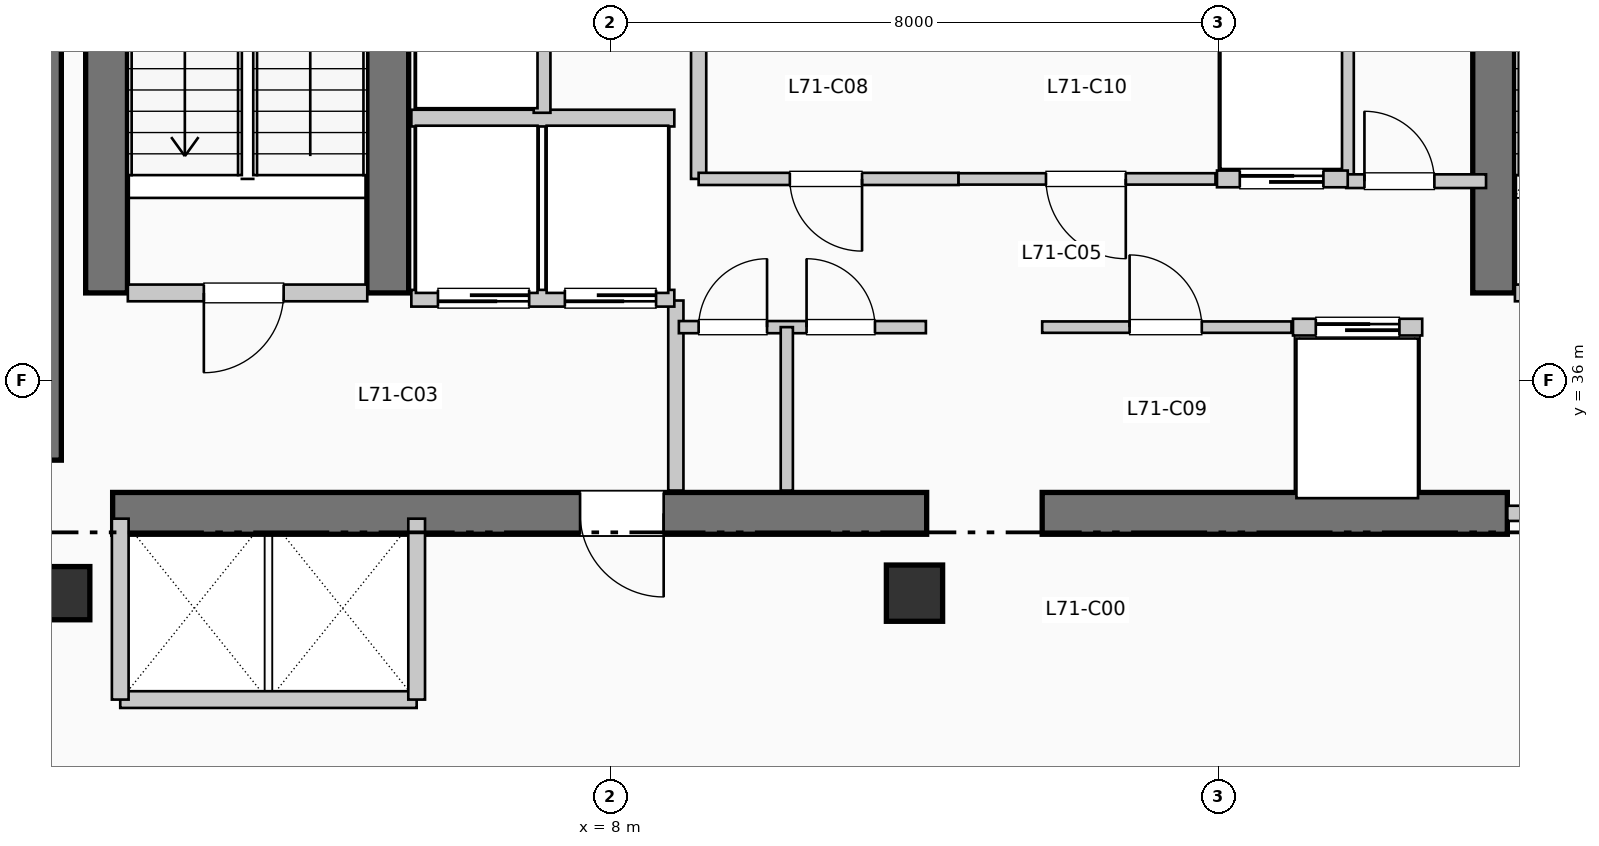
"""IFC4 building model, lengths in metres.
Left out: names, types, materials, properties, quantities, classifications, styles, units other than length and angle.
Written with IfcOpenShell. Run it as: python <this file> out.ifc"""

import sys

from ifc_helpers import new_model, si_unit, direction, frame, frame_2d, origin, origin_2d, place, context, subcontext, project, spatial, rectangle, extrude, element, fill, save


model = new_model("IFC4")
c1 = context("Model", 3, precision=1e-05, world=origin(), true_north=direction((0.0, 1.0)))
c2 = subcontext(c1, "Body", "Model", "MODEL_VIEW")
j1 = project(units=[si_unit("LENGTHUNIT", "METRE"), si_unit("PLANEANGLEUNIT", "RADIAN")], contexts=[c1])
p1 = place(None, origin())
s1 = spatial("IfcSite", under=j1, at=p1, CompositionType="ELEMENT")
p2 = place(p1, origin())
s2 = spatial("IfcBuilding", under=s1, at=p2, CompositionType="ELEMENT")
p3 = place(p2, frame((0.0, 0.0, 292.05)))
s3 = spatial("IfcBuildingStorey", under=s2, at=p3, CompositionType="ELEMENT", Elevation=292.05)
p4 = place(p3, frame((0.5, 34.95, 0.0), z_axis=(0.0, 0.0, 1.0), x_axis=(0.0, 1.0, 0.0)))
e1 = element("IfcWall", 1, at=p4, inside=s3, PredefinedType="SHEAR", context=c2, shape_type="SweptSolid", body=[
    extrude(rectangle(XDim=7.9, YDim=0.55, at=frame_2d((3.95, 0.0))), origin(), (0.0, 0.0, 1.0), 3.96),
])
p5 = place(p3, frame((1.45, 34.25, 0.0), z_axis=(0.0, 0.0, 1.0), x_axis=(1.0, 0.0, 0.0)))
e2 = element("IfcWall", 2, at=p5, inside=s3, PredefinedType="SHEAR", context=c2, shape_type="SweptSolid", body=[
    extrude(rectangle(XDim=10.71, YDim=0.55, at=frame_2d((5.355, 0.0))), origin(), (0.0, 0.0, 1.0), 3.96),
])
p6 = place(p5, frame((7.25, 0.0, 0.0), z_axis=(0.0, 0.0, 1.0), x_axis=(-1.0, 0.0, 0.0)))
e3 = element("IfcOpeningElement", 3, at=p6, cuts=e2, PredefinedType="OPENING", context=c2, shape_type="SweptSolid", body=[
    extrude(rectangle(XDim=1.1, YDim=2.15, at=frame_2d((0.55, 1.075))), frame((0.0, 0.285, 0.0), z_axis=(0.0, -1.0, 0.0), x_axis=(1.0, 0.0, 0.0)), (0.0, 0.0, 1.0), 0.57),
])
p7 = place(p3, frame((13.68, 34.25, 0.0), z_axis=(0.0, 0.0, 1.0), x_axis=(1.0, 0.0, 0.0)))
e4 = element("IfcWall", 4, at=p7, inside=s3, PredefinedType="SHEAR", context=c2, shape_type="SweptSolid", body=[
    extrude(rectangle(XDim=6.12, YDim=0.55, at=frame_2d((3.06, 0.0))), origin(), (0.0, 0.0, 1.0), 3.96),
])
for number, where, z_axis, x_axis in (
    (5, (1.37, 37.15, 0.0), (0.0, 0.0, 1.0), (0.0, 1.0, 0.0)),
    (6, (5.07, 37.15, 0.0), (0.0, 0.0, 1.0), (0.0, 1.0, 0.0)),
    (7, (19.62, 37.15, 0.0), (0.0, 0.0, 1.0), (0.0, 1.0, 0.0)),
):
    element("IfcWall", number, at=place(p3, frame(where, z_axis=z_axis, x_axis=x_axis)), inside=s3, PredefinedType="SHEAR", context=c2, shape_type="SweptSolid", body=[
        extrude(rectangle(XDim=7.89, YDim=0.55, at=frame_2d((3.945, 0.0))), origin(), (0.0, 0.0, 1.0), 3.96),
    ])
p8 = place(p3, frame((0.8, 33.2, 0.0), z_axis=(0.0, 0.0, 1.0), x_axis=(1.0, 0.0, 0.0)))
e8 = element("IfcColumn", 8, at=p8, inside=s3, PredefinedType="COLUMN", context=c2, shape_type="SweptSolid", body=[
    extrude(rectangle(XDim=0.7, YDim=0.7, at=origin_2d()), origin(), (0.0, 0.0, 1.0), 3.96),
])
p9 = place(p3, frame((12.0, 33.2, 0.0), z_axis=(0.0, 0.0, 1.0), x_axis=(1.0, 0.0, 0.0)))
e9 = element("IfcColumn", 9, at=p9, inside=s3, PredefinedType="COLUMN", context=c2, shape_type="SweptSolid", body=[
    extrude(rectangle(XDim=0.74, YDim=0.74, at=origin_2d()), origin(), (0.0, 0.0, 1.0), 3.96),
])
p10 = place(p3, frame((1.65, 37.15, 0.0), z_axis=(0.0, 0.0, 1.0), x_axis=(1.0, 0.0, 0.0)))
e10 = element("IfcWall", 10, at=p10, inside=s3, PredefinedType="PARTITIONING", context=c2, shape_type="SweptSolid", body=[
    extrude(rectangle(XDim=3.15, YDim=0.22, at=frame_2d((1.575, 0.0))), origin(), (0.0, 0.0, 1.0), 3.74),
])
p11 = place(p10, frame((2.05, 0.0, 0.0), z_axis=(0.0, 0.0, 1.0), x_axis=(-1.0, 0.0, 0.0)))
e11 = element("IfcOpeningElement", 11, at=p11, cuts=e10, PredefinedType="OPENING", context=c2, shape_type="SweptSolid", body=[
    extrude(rectangle(XDim=1.05, YDim=2.15, at=frame_2d((0.525, 1.075))), frame((0.0, 0.12, 0.0), z_axis=(0.0, -1.0, 0.0), x_axis=(1.0, 0.0, 0.0)), (0.0, 0.0, 1.0), 0.24),
])
p12 = place(p3, frame((8.86, 34.55, 0.0), z_axis=(0.0, 0.0, 1.0), x_axis=(0.0, 1.0, 0.0)))
e12 = element("IfcWall", 12, at=p12, inside=s3, PredefinedType="PARTITIONING", context=c2, shape_type="SweptSolid", body=[
    extrude(rectangle(XDim=2.5, YDim=0.2, at=frame_2d((1.25, 0.0))), origin(), (0.0, 0.0, 1.0), 3.74),
])
p13 = place(p3, frame((19.9, 37.15, 0.0), z_axis=(0.0, 0.0, 1.0), x_axis=(1.0, 0.0, 0.0)))
e13 = element("IfcWall", 13, at=p13, inside=s3, PredefinedType="PARTITIONING", context=c2, shape_type="SweptSolid", body=[
    extrude(rectangle(XDim=3.15, YDim=0.22, at=frame_2d((1.575, 0.0))), origin(), (0.0, 0.0, 1.0), 3.74),
])
p14 = place(p13, frame((2.05, 0.0, 0.0), z_axis=(0.0, 0.0, 1.0), x_axis=(-1.0, 0.0, 0.0)))
e14 = element("IfcOpeningElement", 14, at=p14, cuts=e13, PredefinedType="OPENING", context=c2, shape_type="SweptSolid", body=[
    extrude(rectangle(XDim=1.05, YDim=2.15, at=frame_2d((0.525, 1.075))), frame((0.0, 0.12, 0.0), z_axis=(0.0, -1.0, 0.0), x_axis=(1.0, 0.0, 0.0)), (0.0, 0.0, 1.0), 0.24),
])
p15 = place(p3, frame((19.8, 34.25, 0.0), z_axis=(0.0, 0.0, 1.0), x_axis=(1.0, 0.0, 0.0)))
e15 = element("IfcWall", 15, at=p15, inside=s3, PredefinedType="PARTITIONING", context=c2, shape_type="SweptSolid", body=[
    extrude(rectangle(XDim=3.25, YDim=0.2, at=frame_2d((1.625, 0.0))), origin(), (0.0, 0.0, 1.0), 3.74),
])
p16 = place(p15, frame((2.15, 0.0, 0.0), z_axis=(0.0, 0.0, 1.0), x_axis=(-1.0, 0.0, 0.0)))
e16 = element("IfcOpeningElement", 16, at=p16, cuts=e15, PredefinedType="OPENING", context=c2, shape_type="SweptSolid", body=[
    extrude(rectangle(XDim=1.1, YDim=2.15, at=frame_2d((0.55, 1.075))), frame((0.0, 0.11, 0.0), z_axis=(0.0, -1.0, 0.0), x_axis=(1.0, 0.0, 0.0)), (0.0, 0.0, 1.0), 0.22),
])
p17 = place(p3, frame((5.38, 37.08, 0.0), z_axis=(0.0, 0.0, 1.0), x_axis=(1.0, 0.0, 0.0)))
e17 = element("IfcWall", 17, at=p17, inside=s3, PredefinedType="PARTITIONING", context=c2, shape_type="SweptSolid", body=[
    extrude(rectangle(XDim=3.46, YDim=0.22, at=frame_2d((1.73, 0.0))), origin(), (0.0, 0.0, 1.0), 3.74),
])
p18 = place(p17, frame((1.55, 0.0, 0.0), z_axis=(0.0, 0.0, 1.0), x_axis=(-1.0, 0.0, 0.0)))
e18 = element("IfcOpeningElement", 18, at=p18, cuts=e17, PredefinedType="OPENING", context=c2, shape_type="SweptSolid", body=[
    extrude(rectangle(XDim=1.2, YDim=2.2, at=frame_2d((0.6, 1.1))), frame((0.0, 0.12, 0.0), z_axis=(0.0, -1.0, 0.0), x_axis=(1.0, 0.0, 0.0)), (0.0, 0.0, 1.0), 0.24),
])
p19 = place(p17, frame((3.22, 0.0, 0.0), z_axis=(0.0, 0.0, 1.0), x_axis=(-1.0, 0.0, 0.0)))
e19 = element("IfcOpeningElement", 19, at=p19, cuts=e17, PredefinedType="OPENING", context=c2, shape_type="SweptSolid", body=[
    extrude(rectangle(XDim=1.2, YDim=2.2, at=frame_2d((0.6, 1.1))), frame((0.0, 0.12, 0.0), z_axis=(0.0, -1.0, 0.0), x_axis=(1.0, 0.0, 0.0)), (0.0, 0.0, 1.0), 0.24),
])
p20 = place(p3, frame((5.38, 39.45, 0.0), z_axis=(0.0, 0.0, 1.0), x_axis=(1.0, 0.0, 0.0)))
e20 = element("IfcWall", 20, at=p20, inside=s3, PredefinedType="PARTITIONING", context=c2, shape_type="SweptSolid", body=[
    extrude(rectangle(XDim=3.46, YDim=0.22, at=frame_2d((1.73, 0.0))), origin(), (0.0, 0.0, 1.0), 3.74),
])
p21 = place(p3, frame((7.1, 39.52, 0.0), z_axis=(0.0, 0.0, 1.0), x_axis=(0.0, 1.0, 0.0)))
e21 = element("IfcWall", 21, at=p21, inside=s3, PredefinedType="PARTITIONING", context=c2, shape_type="SweptSolid", body=[
    extrude(rectangle(XDim=2.93, YDim=0.22, at=frame_2d((1.465, 0.0))), origin(), (0.0, 0.0, 1.0), 3.74),
])
p22 = place(p21, frame((0.85, 0.0, 0.0)))
e22 = element("IfcOpeningElement", 22, at=p22, cuts=e21, PredefinedType="OPENING", context=c2, shape_type="SweptSolid", body=[
    extrude(rectangle(XDim=1.1, YDim=2.2, at=frame_2d((0.55, 1.1))), frame((0.0, 0.12, 0.0), z_axis=(0.0, -1.0, 0.0), x_axis=(1.0, 0.0, 0.0)), (0.0, 0.0, 1.0), 0.24),
])
p23 = place(p3, frame((1.55, 31.8, 0.0), z_axis=(0.0, 0.0, 1.0), x_axis=(1.0, 0.0, 0.0)))
e23 = element("IfcWall", 23, at=p23, inside=s3, PredefinedType="PARTITIONING", context=c2, shape_type="SweptSolid", body=[
    extrude(rectangle(XDim=3.9, YDim=0.22, at=frame_2d((1.95, 0.0))), origin(), (0.0, 0.0, 1.0), 3.74),
])
for number, where, z_axis, x_axis in (
    (24, (1.55, 31.8, 0.0), (0.0, 0.0, 1.0), (0.0, 1.0, 0.0)),
    (25, (5.45, 31.8, 0.0), (0.0, 0.0, 1.0), (0.0, 1.0, 0.0)),
):
    element("IfcWall", number, at=place(p3, frame(where, z_axis=z_axis, x_axis=x_axis)), inside=s3, PredefinedType="PARTITIONING", context=c2, shape_type="SweptSolid", body=[
        extrude(rectangle(XDim=2.38, YDim=0.22, at=frame_2d((1.19, 0.0))), origin(), (0.0, 0.0, 1.0), 3.74),
    ])
for number, where, z_axis, x_axis in (
    (26, (9.16, 38.65, 0.0), (0.0, 0.0, 1.0), (0.0, 1.0, 0.0)),
    (27, (17.68, 38.65, 0.0), (0.0, 0.0, 1.0), (0.0, 1.0, 0.0)),
):
    element("IfcWall", number, at=place(p3, frame(where, z_axis=z_axis, x_axis=x_axis)), inside=s3, PredefinedType="PARTITIONING", context=c2, shape_type="SweptSolid", body=[
        extrude(rectangle(XDim=2.35, YDim=0.2, at=frame_2d((1.175, 0.0))), origin(), (0.0, 0.0, 1.0), 3.74),
    ])
p24 = place(p3, frame((17.68, 38.62, 0.0), z_axis=(0.0, 0.0, 1.0), x_axis=(1.0, 0.0, 0.0)))
e28 = element("IfcWall", 28, at=p24, inside=s3, PredefinedType="PARTITIONING", context=c2, shape_type="SweptSolid", body=[
    extrude(rectangle(XDim=1.84, YDim=0.18, at=frame_2d((0.92, 0.0))), origin(), (0.0, 0.0, 1.0), 3.74),
])
p25 = place(p24, frame((0.24, 0.0, 0.0)))
e29 = element("IfcOpeningElement", 29, at=p25, cuts=e28, PredefinedType="OPENING", context=c2, shape_type="SweptSolid", body=[
    extrude(rectangle(XDim=0.92, YDim=2.1, at=frame_2d((0.46, 1.05))), frame((0.0, 0.1, 0.0), z_axis=(0.0, -1.0, 0.0), x_axis=(1.0, 0.0, 0.0)), (0.0, 0.0, 1.0), 0.2),
])
p26 = place(p3, frame((8.9, 36.7, 0.0), z_axis=(0.0, 0.0, 1.0), x_axis=(1.0, 0.0, 0.0)))
e30 = element("IfcWall", 30, at=p26, inside=s3, PredefinedType="PARTITIONING", context=c2, shape_type="SweptSolid", body=[
    extrude(rectangle(XDim=3.25, YDim=0.16, at=frame_2d((1.625, 0.0))), origin(), (0.0, 0.0, 1.0), 3.74),
])
p27 = place(p26, frame((0.26, 0.0, 0.0)))
e31 = element("IfcOpeningElement", 31, at=p27, cuts=e30, PredefinedType="OPENING", context=c2, shape_type="SweptSolid", body=[
    extrude(rectangle(XDim=0.9, YDim=2.15, at=frame_2d((0.45, 1.075))), frame((0.0, 0.09, 0.0), z_axis=(0.0, -1.0, 0.0), x_axis=(1.0, 0.0, 0.0)), (0.0, 0.0, 1.0), 0.18),
])
p28 = place(p26, frame((1.68, 0.0, 0.0)))
e32 = element("IfcOpeningElement", 32, at=p28, cuts=e30, PredefinedType="OPENING", context=c2, shape_type="SweptSolid", body=[
    extrude(rectangle(XDim=0.9, YDim=2.15, at=frame_2d((0.45, 1.075))), frame((0.0, 0.09, 0.0), z_axis=(0.0, -1.0, 0.0), x_axis=(1.0, 0.0, 0.0)), (0.0, 0.0, 1.0), 0.18),
])
p29 = place(p3, frame((10.32, 34.55, 0.0), z_axis=(0.0, 0.0, 1.0), x_axis=(0.0, 1.0, 0.0)))
e33 = element("IfcWall", 33, at=p29, inside=s3, PredefinedType="PARTITIONING", context=c2, shape_type="SweptSolid", body=[
    extrude(rectangle(XDim=2.15, YDim=0.16, at=frame_2d((1.075, 0.0))), origin(), (0.0, 0.0, 1.0), 3.74),
])
p30 = place(p3, frame((9.16, 38.65, 0.0), z_axis=(0.0, 0.0, 1.0), x_axis=(1.0, 0.0, 0.0)))
e34 = element("IfcWall", 34, at=p30, inside=s3, PredefinedType="PARTITIONING", context=c2, shape_type="SweptSolid", body=[
    extrude(rectangle(XDim=3.42, YDim=0.16, at=frame_2d((1.71, 0.0))), origin(), (0.0, 0.0, 1.0), 3.74),
])
p31 = place(p30, frame((2.15, 0.0, 0.0), z_axis=(0.0, 0.0, 1.0), x_axis=(-1.0, 0.0, 0.0)))
e35 = element("IfcOpeningElement", 35, at=p31, cuts=e34, PredefinedType="OPENING", context=c2, shape_type="SweptSolid", body=[
    extrude(rectangle(XDim=0.95, YDim=2.15, at=frame_2d((0.475, 1.075))), frame((0.0, 0.09, 0.0), z_axis=(0.0, -1.0, 0.0), x_axis=(1.0, 0.0, 0.0)), (0.0, 0.0, 1.0), 0.18),
])
p32 = place(p3, frame((13.68, 36.7, 0.0), z_axis=(0.0, 0.0, 1.0), x_axis=(1.0, 0.0, 0.0)))
e36 = element("IfcWall", 36, at=p32, inside=s3, PredefinedType="PARTITIONING", context=c2, shape_type="SweptSolid", body=[
    extrude(rectangle(XDim=3.28, YDim=0.15, at=frame_2d((1.64, 0.0))), origin(), (0.0, 0.0, 1.0), 3.74),
])
p33 = place(p32, frame((1.15, 0.0, 0.0)))
e37 = element("IfcOpeningElement", 37, at=p33, cuts=e36, PredefinedType="OPENING", context=c2, shape_type="SweptSolid", body=[
    extrude(rectangle(XDim=0.95, YDim=2.15, at=frame_2d((0.475, 1.075))), frame((0.0, 0.085, 0.0), z_axis=(0.0, -1.0, 0.0), x_axis=(1.0, 0.0, 0.0)), (0.0, 0.0, 1.0), 0.17),
])
p34 = place(p3, frame((12.58, 38.65, 0.0), z_axis=(0.0, 0.0, 1.0), x_axis=(1.0, 0.0, 0.0)))
e38 = element("IfcWall", 38, at=p34, inside=s3, PredefinedType="PARTITIONING", context=c2, shape_type="SweptSolid", body=[
    extrude(rectangle(XDim=3.38, YDim=0.15, at=frame_2d((1.69, 0.0))), origin(), (0.0, 0.0, 1.0), 3.74),
])
p35 = place(p34, frame((2.2, 0.0, 0.0), z_axis=(0.0, 0.0, 1.0), x_axis=(-1.0, 0.0, 0.0)))
e39 = element("IfcOpeningElement", 39, at=p35, cuts=e38, PredefinedType="OPENING", context=c2, shape_type="SweptSolid", body=[
    extrude(rectangle(XDim=1.05, YDim=2.15, at=frame_2d((0.525, 1.075))), frame((0.0, 0.085, 0.0), z_axis=(0.0, -1.0, 0.0), x_axis=(1.0, 0.0, 0.0)), (0.0, 0.0, 1.0), 0.17),
])
p36 = place(p3, frame((16.98, 36.7, 0.0), z_axis=(0.0, 0.0, 1.0), x_axis=(1.0, 0.0, 0.0)))
e40 = element("IfcWall", 40, at=p36, inside=s3, PredefinedType="PARTITIONING", context=c2, shape_type="SweptSolid", body=[
    extrude(rectangle(XDim=1.7, YDim=0.22, at=frame_2d((0.85, 0.0))), origin(), (0.0, 0.0, 1.0), 3.74),
])
p37 = place(p36, frame((0.3, 0.0, 0.0)))
e41 = element("IfcOpeningElement", 41, at=p37, cuts=e40, PredefinedType="OPENING", context=c2, shape_type="SweptSolid", body=[
    extrude(rectangle(XDim=1.1, YDim=2.2, at=frame_2d((0.55, 1.1))), frame((0.0, 0.12, 0.0), z_axis=(0.0, -1.0, 0.0), x_axis=(1.0, 0.0, 0.0)), (0.0, 0.0, 1.0), 0.24),
])
p38 = place(p3, frame((15.98, 38.65, 0.0), z_axis=(0.0, 0.0, 1.0), x_axis=(1.0, 0.0, 0.0)))
e42 = element("IfcWall", 42, at=p38, inside=s3, PredefinedType="PARTITIONING", context=c2, shape_type="SweptSolid", body=[
    extrude(rectangle(XDim=1.72, YDim=0.22, at=frame_2d((0.86, 0.0))), origin(), (0.0, 0.0, 1.0), 3.74),
])
p39 = place(p38, frame((0.3, 0.0, 0.0)))
e43 = element("IfcOpeningElement", 43, at=p39, cuts=e42, PredefinedType="OPENING", context=c2, shape_type="SweptSolid", body=[
    extrude(rectangle(XDim=1.1, YDim=2.2, at=frame_2d((0.55, 1.1))), frame((0.0, 0.12, 0.0), z_axis=(0.0, -1.0, 0.0), x_axis=(1.0, 0.0, 0.0)), (0.0, 0.0, 1.0), 0.24),
])
p40 = place(p11, origin())
e44 = element("IfcDoor", 44, at=p40, inside=s3, OperationType="SINGLE_SWING_LEFT", PredefinedType="DOOR", context=c2, shape_type="SweptSolid", body=[
    extrude(rectangle(XDim=1.05, YDim=2.15, at=frame_2d((0.525, 1.075))), frame((0.0, 0.025, 0.0), z_axis=(0.0, -1.0, 0.0), x_axis=(1.0, 0.0, 0.0)), (0.0, 0.0, 1.0), 0.05),
])
fill(e11, e44)
p41 = place(p6, origin())
e45 = element("IfcDoor", 45, at=p41, inside=s3, OperationType="SINGLE_SWING_RIGHT", PredefinedType="DOOR", context=c2, shape_type="SweptSolid", body=[
    extrude(rectangle(XDim=1.1, YDim=2.15, at=frame_2d((0.55, 1.075))), frame((0.0, 0.025, 0.0), z_axis=(0.0, -1.0, 0.0), x_axis=(1.0, 0.0, 0.0)), (0.0, 0.0, 1.0), 0.05),
])
fill(e3, e45)
p42 = place(p18, origin())
e46 = element("IfcDoor", 46, at=p42, inside=s3, OperationType="SLIDING_TO_RIGHT", PredefinedType="DOOR", context=c2, shape_type="SweptSolid", body=[
    extrude(rectangle(XDim=1.2, YDim=2.2, at=frame_2d((0.6, 1.1))), frame((0.0, 0.025, 0.0), z_axis=(0.0, -1.0, 0.0), x_axis=(1.0, 0.0, 0.0)), (0.0, 0.0, 1.0), 0.05),
])
fill(e18, e46)
p43 = place(p19, origin())
e47 = element("IfcDoor", 47, at=p43, inside=s3, OperationType="SLIDING_TO_RIGHT", PredefinedType="DOOR", context=c2, shape_type="SweptSolid", body=[
    extrude(rectangle(XDim=1.2, YDim=2.2, at=frame_2d((0.6, 1.1))), frame((0.0, 0.025, 0.0), z_axis=(0.0, -1.0, 0.0), x_axis=(1.0, 0.0, 0.0)), (0.0, 0.0, 1.0), 0.05),
])
fill(e19, e47)
p44 = place(p25, origin())
e48 = element("IfcDoor", 48, at=p44, inside=s3, OperationType="SINGLE_SWING_LEFT", PredefinedType="DOOR", context=c2, shape_type="SweptSolid", body=[
    extrude(rectangle(XDim=0.92, YDim=2.1, at=frame_2d((0.46, 1.05))), frame((0.0, 0.025, 0.0), z_axis=(0.0, -1.0, 0.0), x_axis=(1.0, 0.0, 0.0)), (0.0, 0.0, 1.0), 0.05),
])
fill(e29, e48)
p45 = place(p27, origin())
e49 = element("IfcDoor", 49, at=p45, inside=s3, OperationType="SINGLE_SWING_RIGHT", PredefinedType="DOOR", context=c2, shape_type="SweptSolid", body=[
    extrude(rectangle(XDim=0.9, YDim=2.15, at=frame_2d((0.45, 1.075))), frame((0.0, 0.025, 0.0), z_axis=(0.0, -1.0, 0.0), x_axis=(1.0, 0.0, 0.0)), (0.0, 0.0, 1.0), 0.05),
])
fill(e31, e49)
p46 = place(p28, origin())
e50 = element("IfcDoor", 50, at=p46, inside=s3, OperationType="SINGLE_SWING_LEFT", PredefinedType="DOOR", context=c2, shape_type="SweptSolid", body=[
    extrude(rectangle(XDim=0.9, YDim=2.15, at=frame_2d((0.45, 1.075))), frame((0.0, 0.025, 0.0), z_axis=(0.0, -1.0, 0.0), x_axis=(1.0, 0.0, 0.0)), (0.0, 0.0, 1.0), 0.05),
])
fill(e32, e50)
p47 = place(p31, origin())
e51 = element("IfcDoor", 51, at=p47, inside=s3, OperationType="SINGLE_SWING_RIGHT", PredefinedType="DOOR", context=c2, shape_type="SweptSolid", body=[
    extrude(rectangle(XDim=0.95, YDim=2.15, at=frame_2d((0.475, 1.075))), frame((0.0, 0.025, 0.0), z_axis=(0.0, -1.0, 0.0), x_axis=(1.0, 0.0, 0.0)), (0.0, 0.0, 1.0), 0.05),
])
fill(e35, e51)
p48 = place(p33, origin())
e52 = element("IfcDoor", 52, at=p48, inside=s3, OperationType="SINGLE_SWING_LEFT", PredefinedType="DOOR", context=c2, shape_type="SweptSolid", body=[
    extrude(rectangle(XDim=0.95, YDim=2.15, at=frame_2d((0.475, 1.075))), frame((0.0, 0.025, 0.0), z_axis=(0.0, -1.0, 0.0), x_axis=(1.0, 0.0, 0.0)), (0.0, 0.0, 1.0), 0.05),
])
fill(e37, e52)
p49 = place(p35, origin())
e53 = element("IfcDoor", 53, at=p49, inside=s3, OperationType="SINGLE_SWING_RIGHT", PredefinedType="DOOR", context=c2, shape_type="SweptSolid", body=[
    extrude(rectangle(XDim=1.05, YDim=2.15, at=frame_2d((0.525, 1.075))), frame((0.0, 0.025, 0.0), z_axis=(0.0, -1.0, 0.0), x_axis=(1.0, 0.0, 0.0)), (0.0, 0.0, 1.0), 0.05),
])
fill(e39, e53)
p50 = place(p37, origin())
e54 = element("IfcDoor", 54, at=p50, inside=s3, OperationType="SLIDING_TO_LEFT", PredefinedType="DOOR", context=c2, shape_type="SweptSolid", body=[
    extrude(rectangle(XDim=1.1, YDim=2.2, at=frame_2d((0.55, 1.1))), frame((0.0, 0.025, 0.0), z_axis=(0.0, -1.0, 0.0), x_axis=(1.0, 0.0, 0.0)), (0.0, 0.0, 1.0), 0.05),
])
fill(e41, e54)
p51 = place(p39, origin())
e55 = element("IfcDoor", 55, at=p51, inside=s3, OperationType="SLIDING_TO_LEFT", PredefinedType="DOOR", context=c2, shape_type="SweptSolid", body=[
    extrude(rectangle(XDim=1.1, YDim=2.2, at=frame_2d((0.55, 1.1))), frame((0.0, 0.025, 0.0), z_axis=(0.0, -1.0, 0.0), x_axis=(1.0, 0.0, 0.0)), (0.0, 0.0, 1.0), 0.05),
])
fill(e43, e55)
save(model, sys.argv[1])
